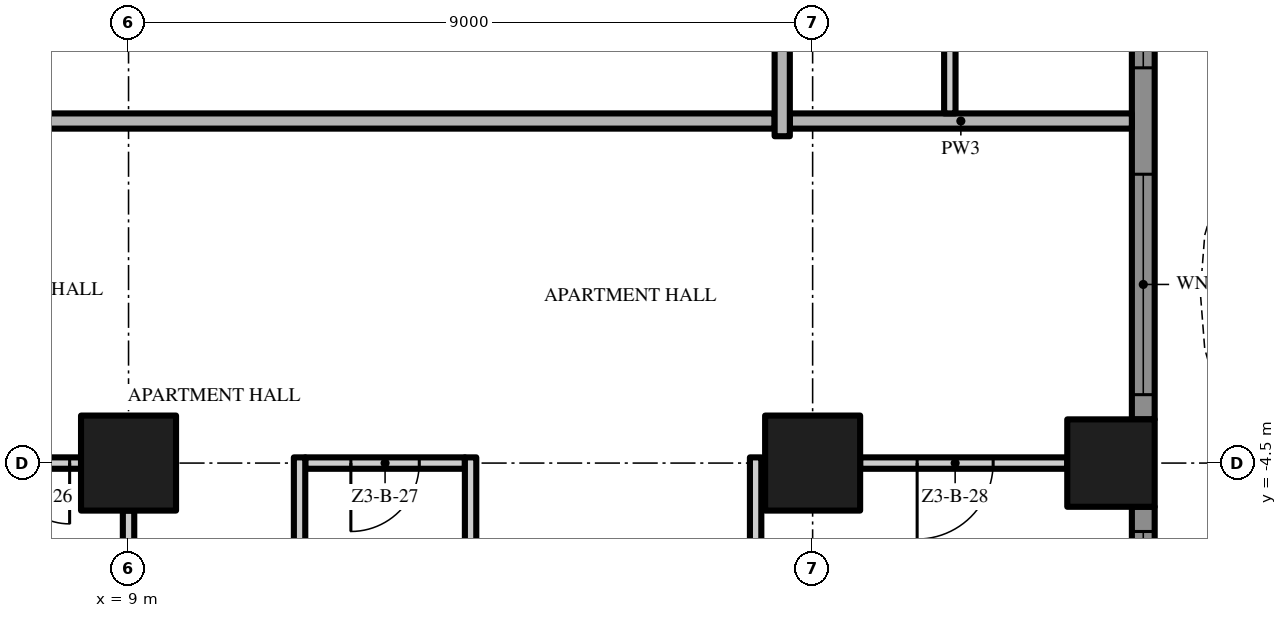
"""IFC4 building model, lengths in metres.
Left out: names, types, materials, properties, quantities, classifications, styles, units other than length and angle.
Written with IfcOpenShell. Run it as: python <this file> out.ifc"""

import sys

from ifc_helpers import new_model, si_unit, direction, frame, frame_2d, origin, origin_2d, place, context, subcontext, project, spatial, polyline, rectangle, outline, extrude, element, fill, save


model = new_model("IFC4")
c1 = context("Model", 3, precision=1e-05, world=origin(), true_north=direction((0.0, 1.0)))
c2 = subcontext(c1, "Body", "Model", "MODEL_VIEW")
j1 = project(units=[si_unit("LENGTHUNIT", "METRE"), si_unit("PLANEANGLEUNIT", "RADIAN")], contexts=[c1])
p1 = place(None, origin())
s1 = spatial("IfcSite", under=j1, at=p1, CompositionType="ELEMENT")
p2 = place(p1, origin())
s2 = spatial("IfcBuilding", under=s1, at=p2, CompositionType="ELEMENT")
p3 = place(p2, frame((0.0, 0.0, 144.0)))
s3 = spatial("IfcBuildingStorey", under=s2, at=p3, CompositionType="ELEMENT", Elevation=144.0)
p4 = place(p3, frame((18.0, -4.5, 0.0), z_axis=(0.0, 0.0, 1.0), x_axis=(1.0, 0.0, 0.0)))
e1 = element("IfcColumn", 1, at=p4, inside=s3, PredefinedType="COLUMN", context=c2, shape_type="SweptSolid", body=[
    extrude(rectangle(XDim=1.25, YDim=1.25, at=origin_2d()), origin(), (0.0, 0.0, 1.0), 3.5),
])
p5 = place(p3, frame((21.925, -4.5, 0.0), z_axis=(0.0, 0.0, 1.0), x_axis=(1.0, 0.0, 0.0)))
e2 = element("IfcColumn", 2, at=p5, inside=s3, PredefinedType="COLUMN", context=c2, shape_type="SweptSolid", body=[
    extrude(rectangle(XDim=1.15, YDim=1.15, at=origin_2d()), origin(), (0.0, 0.0, 1.0), 3.5),
])
p6 = place(p3, frame((9.0, -4.5, 0.0), z_axis=(0.0, 0.0, 1.0), x_axis=(1.0, 0.0, 0.0)))
e3 = element("IfcColumn", 3, at=p6, inside=s3, PredefinedType="COLUMN", context=c2, shape_type="SweptSolid", body=[
    extrude(rectangle(XDim=1.25, YDim=1.25, at=origin_2d()), origin(), (0.0, 0.0, 1.0), 3.5),
])
p7 = place(p3, frame((22.35, -5.075, 0.0), z_axis=(0.0, 0.0, 1.0), x_axis=(0.0, -1.0, 0.0)))
e4 = element("IfcWall", 4, at=p7, inside=s3, PredefinedType="SOLIDWALL", context=c2, shape_type="SweptSolid", body=[
    extrude(rectangle(XDim=7.275, YDim=0.3, at=frame_2d((3.638, 0.0))), origin(), (0.0, 0.0, 1.0), 3.5),
])
p8 = place(p7, frame((4.625, 0.0, 0.0)))
e5 = element("IfcOpeningElement", 5, at=p8, cuts=e4, PredefinedType="OPENING", context=c2, shape_type="SweptSolid", body=[
    extrude(rectangle(XDim=2.35, YDim=2.4, at=frame_2d((1.175, 1.2))), frame((0.0, 0.16, 0.0), z_axis=(0.0, -1.0, 0.0), x_axis=(1.0, 0.0, 0.0)), (0.0, 0.0, 1.0), 0.32),
])
p9 = place(p7, frame((0.325, 0.0, 0.45)))
e6 = element("IfcOpeningElement", 6, at=p9, cuts=e4, PredefinedType="OPENING", context=c2, shape_type="SweptSolid", body=[
    extrude(rectangle(XDim=2.9, YDim=2.65, at=frame_2d((1.45, 1.325))), frame((0.0, 0.16, 0.0), z_axis=(0.0, -1.0, 0.0), x_axis=(1.0, 0.0, 0.0)), (0.0, 0.0, 1.0), 0.32),
])
p10 = place(p3, frame((22.35, 3.925, 0.0), z_axis=(0.0, 0.0, 1.0), x_axis=(0.0, -1.0, 0.0)))
e7 = element("IfcWall", 7, at=p10, inside=s3, PredefinedType="SOLIDWALL", context=c2, shape_type="SweptSolid", body=[
    extrude(rectangle(XDim=7.85, YDim=0.3, at=frame_2d((3.925, 0.0))), origin(), (0.0, 0.0, 1.0), 3.5),
])
p11 = place(p10, frame((4.625, 0.0, 0.45)))
e8 = element("IfcOpeningElement", 8, at=p11, cuts=e7, PredefinedType="OPENING", context=c2, shape_type="SweptSolid", body=[
    extrude(rectangle(XDim=2.9, YDim=2.65, at=frame_2d((1.45, 1.325))), frame((0.0, 0.16, 0.0), z_axis=(0.0, -1.0, 0.0), x_axis=(1.0, 0.0, 0.0)), (0.0, 0.0, 1.0), 0.32),
])
p12 = place(p10, frame((0.325, 0.0, 0.45)))
e9 = element("IfcOpeningElement", 9, at=p12, cuts=e7, PredefinedType="OPENING", context=c2, shape_type="SweptSolid", body=[
    extrude(rectangle(XDim=2.9, YDim=2.65, at=frame_2d((1.45, 1.325))), frame((0.0, 0.16, 0.0), z_axis=(0.0, -1.0, 0.0), x_axis=(1.0, 0.0, 0.0)), (0.0, 0.0, 1.0), 0.32),
])
p13 = place(p3, origin())
e10 = element("IfcWall", 10, at=p13, inside=s3, PredefinedType="USERDEFINED", context=c2, shape_type="SweptSolid", body=[
    extrude(outline(polyline([(24.3, -13.5), (25.005, -12.0), (25.441, -10.5), (25.5, -9.75), (25.441, -9.0), (25.005, -7.5), (24.3, -6.0), (23.595, -4.5), (23.159, -3.0), (23.1, -2.25), (23.159, -1.5), (23.595, 0.0), (24.3, 1.5), (25.005, 3.0), (25.441, 4.5), (25.5, 5.25), (25.441, 6.0), (25.005, 7.5), (24.3, 9.0), (23.595, 10.5), (23.159, 12.0), (23.1, 12.75), (23.159, 13.5), (23.595, 15.0), (24.3, 16.5), (25.005, 18.0), (24.779, 18.106), (24.074, 16.606), (23.36, 15.089), (22.911, 13.545), (22.849, 12.75), (22.911, 11.955), (23.36, 10.411), (24.074, 8.894), (24.771, 7.411), (25.194, 5.955), (25.249, 5.25), (25.194, 4.545), (24.771, 3.089), (24.074, 1.606), (23.36, 0.089), (22.911, -1.455), (22.849, -2.25), (22.911, -3.045), (23.36, -4.589), (24.074, -6.106), (24.771, -7.589), (25.194, -9.045), (25.249, -9.75), (25.194, -10.455), (24.771, -11.911), (24.074, -13.394), (24.3, -13.5)])), origin(), (0.0, 0.0, 1.0), 0.9),
])
p14 = place(p3, frame((8.375, -4.5, 0.0), z_axis=(0.0, 0.0, 1.0), x_axis=(-1.0, 0.0, 0.0)))
e11 = element("IfcWall", 11, at=p14, inside=s3, PredefinedType="PARTITIONING", context=c2, shape_type="SweptSolid", body=[
    extrude(rectangle(XDim=1.55, YDim=0.15, at=frame_2d((0.775, 0.0))), origin(), (0.0, 0.0, 1.0), 3.5),
])
p15 = place(p14, frame((0.15, 0.0, 0.0)))
e12 = element("IfcOpeningElement", 12, at=p15, cuts=e11, PredefinedType="OPENING", context=c2, shape_type="SweptSolid", body=[
    extrude(rectangle(XDim=0.8, YDim=2.0, at=frame_2d((0.4, 1.0))), frame((0.0, 0.085, 0.0), z_axis=(0.0, -1.0, 0.0), x_axis=(1.0, 0.0, 0.0)), (0.0, 0.0, 1.0), 0.17),
])
p16 = place(p3, frame((13.425, -4.5, 0.0), z_axis=(0.0, 0.0, 1.0), x_axis=(-1.0, 0.0, 0.0)))
e13 = element("IfcWall", 13, at=p16, inside=s3, PredefinedType="PARTITIONING", context=c2, shape_type="SweptSolid", body=[
    extrude(rectangle(XDim=2.1, YDim=0.15, at=frame_2d((1.05, 0.0))), origin(), (0.0, 0.0, 1.0), 3.5),
])
p17 = place(p16, frame((0.6, 0.0, 0.0)))
e14 = element("IfcOpeningElement", 14, at=p17, cuts=e13, PredefinedType="OPENING", context=c2, shape_type="SweptSolid", body=[
    extrude(rectangle(XDim=0.9, YDim=2.1, at=frame_2d((0.45, 1.05))), frame((0.0, 0.085, 0.0), z_axis=(0.0, -1.0, 0.0), x_axis=(1.0, 0.0, 0.0)), (0.0, 0.0, 1.0), 0.17),
])
p18 = place(p3, frame((21.35, -4.5, 0.0), z_axis=(0.0, 0.0, 1.0), x_axis=(-1.0, 0.0, 0.0)))
e15 = element("IfcWall", 15, at=p18, inside=s3, PredefinedType="PARTITIONING", context=c2, shape_type="SweptSolid", body=[
    extrude(rectangle(XDim=2.725, YDim=0.15, at=frame_2d((1.363, 0.0))), origin(), (0.0, 0.0, 1.0), 3.5),
])
p19 = place(p18, frame((0.975, 0.0, 0.0)))
e16 = element("IfcOpeningElement", 16, at=p19, cuts=e15, PredefinedType="OPENING", context=c2, shape_type="SweptSolid", body=[
    extrude(rectangle(XDim=1.0, YDim=2.4, at=frame_2d((0.5, 1.2))), frame((0.0, 0.085, 0.0), z_axis=(0.0, -1.0, 0.0), x_axis=(1.0, 0.0, 0.0)), (0.0, 0.0, 1.0), 0.17),
])
p20 = place(p3, frame((17.5, 0.0, 0.0), z_axis=(0.0, 0.0, 1.0), x_axis=(-1.0, 0.0, 0.0)))
e17 = element("IfcWall", 17, at=p20, inside=s3, PredefinedType="PARTITIONING", context=c2, shape_type="SweptSolid", body=[
    extrude(rectangle(XDim=35.0, YDim=0.2, at=frame_2d((17.5, 0.0))), origin(), (0.0, 0.0, 1.0), 3.5),
])
p21 = place(p20, frame((28.0, 0.0, 0.0)))
e18 = element("IfcOpeningElement", 18, at=p21, cuts=e17, PredefinedType="OPENING", context=c2, shape_type="SweptSolid", body=[
    extrude(rectangle(XDim=1.5, YDim=2.4, at=frame_2d((0.75, 1.2))), frame((0.0, 0.11, 0.0), z_axis=(0.0, -1.0, 0.0), x_axis=(1.0, 0.0, 0.0)), (0.0, 0.0, 1.0), 0.22),
])
p22 = place(p20, frame((10.0, 0.0, 0.0)))
e19 = element("IfcOpeningElement", 19, at=p22, cuts=e17, PredefinedType="OPENING", context=c2, shape_type="SweptSolid", body=[
    extrude(rectangle(XDim=1.5, YDim=2.4, at=frame_2d((0.75, 1.2))), frame((0.0, 0.11, 0.0), z_axis=(0.0, -1.0, 0.0), x_axis=(1.0, 0.0, 0.0)), (0.0, 0.0, 1.0), 0.22),
])
p23 = place(p3, frame((17.7, 0.0, 0.0), z_axis=(0.0, 0.0, 1.0), x_axis=(1.0, 0.0, 0.0)))
e20 = element("IfcWall", 20, at=p23, inside=s3, PredefinedType="PARTITIONING", context=c2, shape_type="SweptSolid", body=[
    extrude(rectangle(XDim=4.5, YDim=0.2, at=frame_2d((2.25, 0.0))), origin(), (0.0, 0.0, 1.0), 3.5),
])
p24 = place(p3, frame((9.0, -12.875, 0.0), z_axis=(0.0, 0.0, 1.0), x_axis=(0.0, 1.0, 0.0)))
e21 = element("IfcWall", 21, at=p24, inside=s3, PredefinedType="PARTITIONING", context=c2, shape_type="SweptSolid", body=[
    extrude(rectangle(XDim=7.75, YDim=0.15, at=frame_2d((3.875, 0.0))), origin(), (0.0, 0.0, 1.0), 3.5),
])
p25 = place(p3, frame((11.25, -8.925, 0.0), z_axis=(0.0, 0.0, 1.0), x_axis=(0.0, 1.0, 0.0)))
e22 = element("IfcWall", 22, at=p25, inside=s3, PredefinedType="PARTITIONING", context=c2, shape_type="SweptSolid", body=[
    extrude(rectangle(XDim=4.5, YDim=0.15, at=frame_2d((2.25, 0.0))), origin(), (0.0, 0.0, 1.0), 3.5),
])
p26 = place(p3, frame((13.5, -17.7, 0.0), z_axis=(0.0, 0.0, 1.0), x_axis=(0.0, 1.0, 0.0)))
e23 = element("IfcWall", 23, at=p26, inside=s3, PredefinedType="PARTITIONING", context=c2, shape_type="SweptSolid", body=[
    extrude(rectangle(XDim=13.275, YDim=0.15, at=frame_2d((6.638, 0.0))), origin(), (0.0, 0.0, 1.0), 3.5),
])
p27 = place(p3, frame((17.25, -8.925, 0.0), z_axis=(0.0, 0.0, 1.0), x_axis=(0.0, 1.0, 0.0)))
e24 = element("IfcWall", 24, at=p27, inside=s3, PredefinedType="PARTITIONING", context=c2, shape_type="SweptSolid", body=[
    extrude(rectangle(XDim=4.5, YDim=0.15, at=frame_2d((2.25, 0.0))), origin(), (0.0, 0.0, 1.0), 3.5),
])
p28 = place(p3, frame((17.6, -0.2, 0.0), z_axis=(0.0, 0.0, 1.0), x_axis=(0.0, 1.0, 0.0)))
e25 = element("IfcWall", 25, at=p28, inside=s3, PredefinedType="PARTITIONING", context=c2, shape_type="SweptSolid", body=[
    extrude(rectangle(XDim=4.075, YDim=0.2, at=frame_2d((2.038, 0.0))), origin(), (0.0, 0.0, 1.0), 3.5),
])
p29 = place(p3, frame((19.805, 0.1, 0.0), z_axis=(0.0, 0.0, 1.0), x_axis=(0.0, 1.0, 0.0)))
e26 = element("IfcWall", 26, at=p29, inside=s3, PredefinedType="PARTITIONING", context=c2, shape_type="SweptSolid", body=[
    extrude(rectangle(XDim=2.225, YDim=0.15, at=frame_2d((1.113, 0.0))), origin(), (0.0, 0.0, 1.0), 3.5),
])
p30 = place(p9, origin())
e27 = element("IfcWindow", 27, at=p30, inside=s3, PartitioningType="SINGLE_PANEL", PredefinedType="WINDOW", context=c2, shape_type="SweptSolid", body=[
    extrude(rectangle(XDim=2.9, YDim=2.65, at=frame_2d((1.45, 1.325))), frame((0.0, 0.03, 0.0), z_axis=(0.0, -1.0, 0.0), x_axis=(1.0, 0.0, 0.0)), (0.0, 0.0, 1.0), 0.06),
])
fill(e6, e27)
p31 = place(p11, origin())
e28 = element("IfcWindow", 28, at=p31, inside=s3, PartitioningType="SINGLE_PANEL", PredefinedType="WINDOW", context=c2, shape_type="SweptSolid", body=[
    extrude(rectangle(XDim=2.9, YDim=2.65, at=frame_2d((1.45, 1.325))), frame((0.0, 0.03, 0.0), z_axis=(0.0, -1.0, 0.0), x_axis=(1.0, 0.0, 0.0)), (0.0, 0.0, 1.0), 0.06),
])
fill(e8, e28)
p32 = place(p12, origin())
e29 = element("IfcWindow", 29, at=p32, inside=s3, PartitioningType="SINGLE_PANEL", PredefinedType="WINDOW", context=c2, shape_type="SweptSolid", body=[
    extrude(rectangle(XDim=2.9, YDim=2.65, at=frame_2d((1.45, 1.325))), frame((0.0, 0.03, 0.0), z_axis=(0.0, -1.0, 0.0), x_axis=(1.0, 0.0, 0.0)), (0.0, 0.0, 1.0), 0.06),
])
fill(e9, e29)
p33 = place(p15, origin())
e30 = element("IfcDoor", 30, at=p33, inside=s3, OperationType="SINGLE_SWING_LEFT", PredefinedType="DOOR", context=c2, shape_type="SweptSolid", body=[
    extrude(rectangle(XDim=0.8, YDim=2.0, at=frame_2d((0.4, 1.0))), frame((0.0, 0.025, 0.0), z_axis=(0.0, -1.0, 0.0), x_axis=(1.0, 0.0, 0.0)), (0.0, 0.0, 1.0), 0.05),
])
fill(e12, e30)
p34 = place(p17, origin())
e31 = element("IfcDoor", 31, at=p34, inside=s3, OperationType="SINGLE_SWING_RIGHT", PredefinedType="DOOR", context=c2, shape_type="SweptSolid", body=[
    extrude(rectangle(XDim=0.9, YDim=2.1, at=frame_2d((0.45, 1.05))), frame((0.0, 0.025, 0.0), z_axis=(0.0, -1.0, 0.0), x_axis=(1.0, 0.0, 0.0)), (0.0, 0.0, 1.0), 0.05),
])
fill(e14, e31)
p35 = place(p19, origin())
e32 = element("IfcDoor", 32, at=p35, inside=s3, OperationType="SINGLE_SWING_RIGHT", PredefinedType="DOOR", context=c2, shape_type="SweptSolid", body=[
    extrude(rectangle(XDim=1.0, YDim=2.4, at=frame_2d((0.5, 1.2))), frame((0.0, 0.025, 0.0), z_axis=(0.0, -1.0, 0.0), x_axis=(1.0, 0.0, 0.0)), (0.0, 0.0, 1.0), 0.05),
])
fill(e16, e32)
save(model, sys.argv[1])
